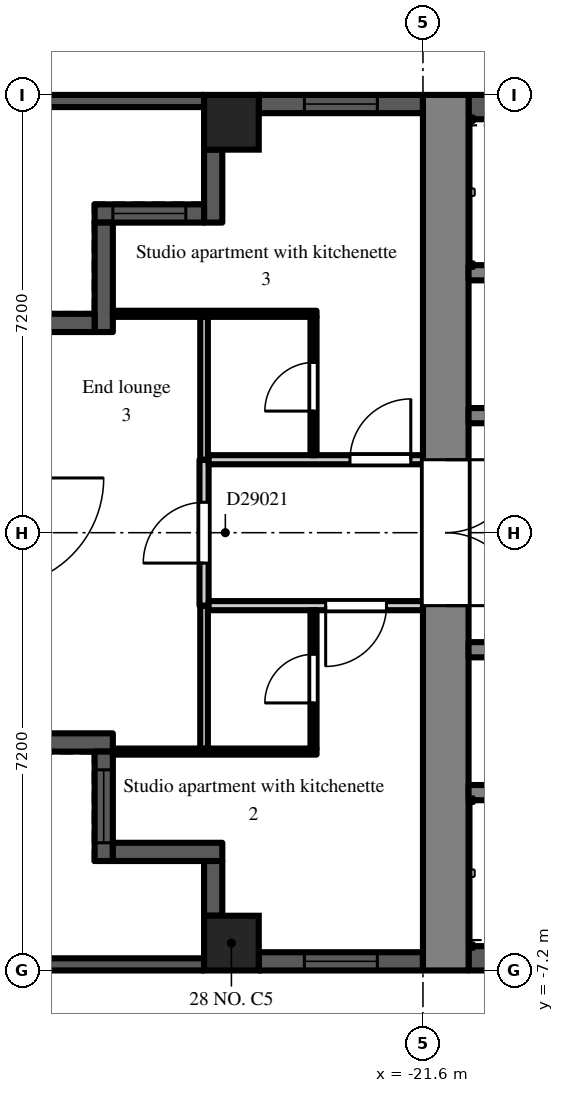
"""IFC4 building model, lengths in metres.
Left out: names, types, materials, properties, quantities, classifications, styles, units other than length and angle.
Written with IfcOpenShell. Run it as: python <this file> out.ifc"""

import sys

from ifc_helpers import new_model, si_unit, direction, frame, frame_2d, origin, origin_2d, place, context, subcontext, project, spatial, rectangle, extrude, element, fill, save


model = new_model("IFC4")
c1 = context("Model", 3, precision=1e-05, world=origin(), true_north=direction((0.0, 1.0)))
c2 = subcontext(c1, "Body", "Model", "MODEL_VIEW")
j1 = project(units=[si_unit("LENGTHUNIT", "METRE"), si_unit("PLANEANGLEUNIT", "RADIAN")], contexts=[c1])
p1 = place(None, origin())
s1 = spatial("IfcSite", under=j1, at=p1, CompositionType="ELEMENT")
p2 = place(p1, origin())
s2 = spatial("IfcBuilding", under=s1, at=p2, CompositionType="ELEMENT")
p3 = place(p2, frame((0.0, 0.0, 198.9)))
s3 = spatial("IfcBuildingStorey", under=s2, at=p3, CompositionType="ELEMENT", Elevation=198.9)
for number, where, z_axis, x_axis in (
    (1, (-24.75, -6.75, 0.0), (0.0, 0.0, 1.0), (1.0, 0.0, 0.0)),
    (2, (-24.75, 6.75, 0.0), (0.0, 0.0, 1.0), (1.0, 0.0, 0.0)),
):
    element("IfcColumn", number, at=place(p3, frame(where, z_axis=z_axis, x_axis=x_axis)), inside=s3, PredefinedType="COLUMN", context=c2, shape_type="SweptSolid", body=[
        extrude(rectangle(XDim=0.9, YDim=0.9, at=origin_2d()), origin(), (0.0, 0.0, 1.0), 3.0),
    ])
p4 = place(p3, frame((-21.6, 7.05, 0.0), z_axis=(0.0, 0.0, 1.0), x_axis=(-1.0, 0.0, 0.0)))
e3 = element("IfcWall", 3, at=p4, inside=s3, PredefinedType="SOLIDWALL", context=c2, shape_type="SweptSolid", body=[
    extrude(rectangle(XDim=2.7, YDim=0.3, at=frame_2d((1.35, 0.0))), origin(), (0.0, 0.0, 1.0), 2.3),
])
p5 = place(p4, frame((0.75, 0.0, 0.2)))
e4 = element("IfcOpeningElement", 4, at=p5, cuts=e3, PredefinedType="OPENING", context=c2, shape_type="SweptSolid", body=[
    extrude(rectangle(XDim=1.2, YDim=1.85, at=frame_2d((0.6, 0.925))), frame((0.0, 0.16, 0.0), z_axis=(0.0, -1.0, 0.0), x_axis=(1.0, 0.0, 0.0)), (0.0, 0.0, 1.0), 0.32),
])
p6 = place(p3, frame((-25.05, 6.3, 0.0), z_axis=(0.0, 0.0, 1.0), x_axis=(0.0, -1.0, 0.0)))
e5 = element("IfcWall", 5, at=p6, inside=s3, PredefinedType="SOLIDWALL", context=c2, shape_type="SweptSolid", body=[
    extrude(rectangle(XDim=1.2, YDim=0.3, at=frame_2d((0.6, 0.0))), origin(), (0.0, 0.0, 1.0), 2.6),
])
p7 = place(p3, frame((-25.2, 5.25, 0.0), z_axis=(0.0, 0.0, 1.0), x_axis=(-1.0, 0.0, 0.0)))
e6 = element("IfcWall", 6, at=p7, inside=s3, PredefinedType="SOLIDWALL", context=c2, shape_type="SweptSolid", body=[
    extrude(rectangle(XDim=1.8, YDim=0.3, at=frame_2d((0.9, 0.0))), origin(), (0.0, 0.0, 1.0), 2.6),
])
p8 = place(p7, frame((0.3, 0.0, 0.2)))
e7 = element("IfcOpeningElement", 7, at=p8, cuts=e6, PredefinedType="OPENING", context=c2, shape_type="SweptSolid", body=[
    extrude(rectangle(XDim=1.2, YDim=1.85, at=frame_2d((0.6, 0.925))), frame((0.0, 0.16, 0.0), z_axis=(0.0, -1.0, 0.0), x_axis=(1.0, 0.0, 0.0)), (0.0, 0.0, 1.0), 0.32),
])
p9 = place(p3, frame((-26.85, 5.1, 0.0), z_axis=(0.0, 0.0, 1.0), x_axis=(0.0, -1.0, 0.0)))
e8 = element("IfcWall", 8, at=p9, inside=s3, PredefinedType="SOLIDWALL", context=c2, shape_type="SweptSolid", body=[
    extrude(rectangle(XDim=1.8, YDim=0.3, at=frame_2d((0.9, 0.0))), origin(), (0.0, 0.0, 1.0), 2.6),
])
p10 = place(p3, frame((-27.0, 3.45, 0.0), z_axis=(0.0, 0.0, 1.0), x_axis=(-1.0, 0.0, 0.0)))
e9 = element("IfcWall", 9, at=p10, inside=s3, PredefinedType="SOLIDWALL", context=c2, shape_type="SweptSolid", body=[
    extrude(rectangle(XDim=0.9, YDim=0.3, at=frame_2d((0.45, 0.0))), origin(), (0.0, 0.0, 1.0), 2.6),
])
p11 = place(p3, frame((-27.9, -3.45, 0.0), z_axis=(0.0, 0.0, 1.0), x_axis=(1.0, 0.0, 0.0)))
e10 = element("IfcWall", 10, at=p11, inside=s3, PredefinedType="SOLIDWALL", context=c2, shape_type="SweptSolid", body=[
    extrude(rectangle(XDim=1.2, YDim=0.3, at=frame_2d((0.6, 0.0))), origin(), (0.0, 0.0, 1.0), 2.6),
])
p12 = place(p3, frame((-26.85, -3.6, 0.0), z_axis=(0.0, 0.0, 1.0), x_axis=(0.0, -1.0, 0.0)))
e11 = element("IfcWall", 11, at=p12, inside=s3, PredefinedType="SOLIDWALL", context=c2, shape_type="SweptSolid", body=[
    extrude(rectangle(XDim=1.8, YDim=0.3, at=frame_2d((0.9, 0.0))), origin(), (0.0, 0.0, 1.0), 2.6),
])
p13 = place(p12, frame((0.3, 0.0, 0.2)))
e12 = element("IfcOpeningElement", 12, at=p13, cuts=e11, PredefinedType="OPENING", context=c2, shape_type="SweptSolid", body=[
    extrude(rectangle(XDim=1.2, YDim=1.85, at=frame_2d((0.6, 0.925))), frame((0.0, 0.16, 0.0), z_axis=(0.0, -1.0, 0.0), x_axis=(1.0, 0.0, 0.0)), (0.0, 0.0, 1.0), 0.32),
])
p14 = place(p3, frame((-26.7, -5.25, 0.0), z_axis=(0.0, 0.0, 1.0), x_axis=(1.0, 0.0, 0.0)))
e13 = element("IfcWall", 13, at=p14, inside=s3, PredefinedType="SOLIDWALL", context=c2, shape_type="SweptSolid", body=[
    extrude(rectangle(XDim=1.8, YDim=0.3, at=frame_2d((0.9, 0.0))), origin(), (0.0, 0.0, 1.0), 2.6),
])
p15 = place(p3, frame((-25.05, -5.4, 0.0), z_axis=(0.0, 0.0, 1.0), x_axis=(0.0, -1.0, 0.0)))
e14 = element("IfcWall", 14, at=p15, inside=s3, PredefinedType="SOLIDWALL", context=c2, shape_type="SweptSolid", body=[
    extrude(rectangle(XDim=0.9, YDim=0.3, at=frame_2d((0.45, 0.0))), origin(), (0.0, 0.0, 1.0), 2.6),
])
p16 = place(p3, frame((-24.3, -7.05, 0.0), z_axis=(0.0, 0.0, 1.0), x_axis=(1.0, 0.0, 0.0)))
e15 = element("IfcWall", 15, at=p16, inside=s3, PredefinedType="SOLIDWALL", context=c2, shape_type="SweptSolid", body=[
    extrude(rectangle(XDim=2.7, YDim=0.3, at=frame_2d((1.35, 0.0))), origin(), (0.0, 0.0, 1.0), 2.3),
])
p17 = place(p16, frame((0.75, 0.0, 0.2)))
e16 = element("IfcOpeningElement", 16, at=p17, cuts=e15, PredefinedType="OPENING", context=c2, shape_type="SweptSolid", body=[
    extrude(rectangle(XDim=1.2, YDim=1.85, at=frame_2d((0.6, 0.925))), frame((0.0, 0.16, 0.0), z_axis=(0.0, -1.0, 0.0), x_axis=(1.0, 0.0, 0.0)), (0.0, 0.0, 1.0), 0.32),
])
p18 = place(p3, frame((-25.2, 7.1, 0.0), z_axis=(0.0, 0.0, 1.0), x_axis=(-1.0, 0.0, 0.0)))
e17 = element("IfcWall", 17, at=p18, inside=s3, PredefinedType="PARAPET", context=c2, shape_type="SweptSolid", body=[
    extrude(rectangle(XDim=14.2, YDim=0.2, at=frame_2d((7.1, 0.0))), origin(), (0.0, 0.0, 1.0), 1.1),
])
p19 = place(p3, frame((-39.6, -7.1, 0.0), z_axis=(0.0, 0.0, 1.0), x_axis=(1.0, 0.0, 0.0)))
e18 = element("IfcWall", 18, at=p19, inside=s3, PredefinedType="PARAPET", context=c2, shape_type="SweptSolid", body=[
    extrude(rectangle(XDim=14.4, YDim=0.2, at=frame_2d((7.2, 0.0))), origin(), (0.0, 0.0, 1.0), 1.1),
])
p20 = place(p3, frame((-21.225, -7.2, 0.0), z_axis=(0.0, 0.0, 1.0), x_axis=(0.0, 1.0, 0.0)))
e19 = element("IfcWall", 19, at=p20, inside=s3, PredefinedType="SHEAR", context=c2, shape_type="SweptSolid", body=[
    extrude(rectangle(XDim=14.4, YDim=0.75, at=frame_2d((7.2, 0.0))), origin(), (0.0, 0.0, 1.0), 2.6),
])
p21 = place(p20, frame((6.0, 0.0, 0.0)))
e20 = element("IfcOpeningElement", 20, at=p21, cuts=e19, PredefinedType="OPENING", context=c2, shape_type="SweptSolid", body=[
    extrude(rectangle(XDim=2.4, YDim=2.2, at=frame_2d((1.2, 1.1))), frame((0.0, 0.385, 0.0), z_axis=(0.0, -1.0, 0.0), x_axis=(1.0, 0.0, 0.0)), (0.0, 0.0, 1.0), 0.77),
])
p22 = place(p3, frame((-7.9, 7.0, 0.0), z_axis=(0.0, 0.0, 1.0), x_axis=(-1.0, 0.0, 0.0)))
e21 = element("IfcWall", 21, at=p22, inside=s3, PredefinedType="SHEAR", context=c2, shape_type="SweptSolid", body=[
    extrude(rectangle(XDim=12.95, YDim=0.4, at=frame_2d((6.475, 0.0))), origin(), (0.0, 0.0, 1.0), 2.6),
])
p23 = place(p3, frame((-7.9, 1.925, 0.0), z_axis=(0.0, 0.0, 1.0), x_axis=(-1.0, 0.0, 0.0)))
e22 = element("IfcWall", 22, at=p23, inside=s3, PredefinedType="SHEAR", context=c2, shape_type="SweptSolid", body=[
    extrude(rectangle(XDim=12.95, YDim=0.25, at=frame_2d((6.475, 0.0))), origin(), (0.0, 0.0, 1.0), 2.6),
])
p24 = place(p23, frame((4.825, 0.0, 0.0)))
e23 = element("IfcOpeningElement", 23, at=p24, cuts=e22, PredefinedType="OPENING", context=c2, shape_type="SweptSolid", body=[
    extrude(rectangle(XDim=1.1, YDim=2.1, at=frame_2d((0.55, 1.05))), frame((0.0, 0.135, 0.0), z_axis=(0.0, -1.0, 0.0), x_axis=(1.0, 0.0, 0.0)), (0.0, 0.0, 1.0), 0.27),
])
p25 = place(p23, frame((7.025, 0.0, 0.0)))
e24 = element("IfcOpeningElement", 24, at=p25, cuts=e22, PredefinedType="OPENING", context=c2, shape_type="SweptSolid", body=[
    extrude(rectangle(XDim=1.1, YDim=2.1, at=frame_2d((0.55, 1.05))), frame((0.0, 0.135, 0.0), z_axis=(0.0, -1.0, 0.0), x_axis=(1.0, 0.0, 0.0)), (0.0, 0.0, 1.0), 0.27),
])
p26 = place(p23, frame((9.225, 0.0, 0.0)))
e25 = element("IfcOpeningElement", 25, at=p26, cuts=e22, PredefinedType="OPENING", context=c2, shape_type="SweptSolid", body=[
    extrude(rectangle(XDim=1.1, YDim=2.1, at=frame_2d((0.55, 1.05))), frame((0.0, 0.135, 0.0), z_axis=(0.0, -1.0, 0.0), x_axis=(1.0, 0.0, 0.0)), (0.0, 0.0, 1.0), 0.27),
])
p27 = place(p23, frame((0.525, 0.0, 0.0)))
e26 = element("IfcOpeningElement", 26, at=p27, cuts=e22, PredefinedType="OPENING", context=c2, shape_type="SweptSolid", body=[
    extrude(rectangle(XDim=0.9, YDim=2.1, at=frame_2d((0.45, 1.05))), frame((0.0, 0.135, 0.0), z_axis=(0.0, -1.0, 0.0), x_axis=(1.0, 0.0, 0.0)), (0.0, 0.0, 1.0), 0.27),
])
p28 = place(p23, frame((2.625, 0.0, 0.0)))
e27 = element("IfcOpeningElement", 27, at=p28, cuts=e22, PredefinedType="OPENING", context=c2, shape_type="SweptSolid", body=[
    extrude(rectangle(XDim=1.1, YDim=2.1, at=frame_2d((0.55, 1.05))), frame((0.0, 0.135, 0.0), z_axis=(0.0, -1.0, 0.0), x_axis=(1.0, 0.0, 0.0)), (0.0, 0.0, 1.0), 0.27),
])
p29 = place(p23, frame((11.525, 0.0, 0.0)))
e28 = element("IfcOpeningElement", 28, at=p29, cuts=e22, PredefinedType="OPENING", context=c2, shape_type="SweptSolid", body=[
    extrude(rectangle(XDim=0.9, YDim=2.1, at=frame_2d((0.45, 1.05))), frame((0.0, 0.135, 0.0), z_axis=(0.0, -1.0, 0.0), x_axis=(1.0, 0.0, 0.0)), (0.0, 0.0, 1.0), 0.27),
])
p30 = place(p3, frame((-12.3, 4.275, 0.0), z_axis=(0.0, 0.0, 1.0), x_axis=(-1.0, 0.0, 0.0)))
e29 = element("IfcWall", 29, at=p30, inside=s3, PredefinedType="SHEAR", context=c2, shape_type="SweptSolid", body=[
    extrude(rectangle(XDim=8.55, YDim=0.25, at=frame_2d((4.275, 0.0))), origin(), (0.0, 0.0, 1.0), 2.6),
])
p31 = place(p3, frame((-7.9, -7.0, 0.0), z_axis=(0.0, 0.0, 1.0), x_axis=(-1.0, 0.0, 0.0)))
e30 = element("IfcWall", 30, at=p31, inside=s3, PredefinedType="SHEAR", context=c2, shape_type="SweptSolid", body=[
    extrude(rectangle(XDim=12.95, YDim=0.4, at=frame_2d((6.475, 0.0))), origin(), (0.0, 0.0, 1.0), 2.6),
])
p32 = place(p3, frame((-7.9, -1.925, 0.0), z_axis=(0.0, 0.0, 1.0), x_axis=(-1.0, 0.0, 0.0)))
e31 = element("IfcWall", 31, at=p32, inside=s3, PredefinedType="SHEAR", context=c2, shape_type="SweptSolid", body=[
    extrude(rectangle(XDim=12.95, YDim=0.25, at=frame_2d((6.475, 0.0))), origin(), (0.0, 0.0, 1.0), 2.6),
])
p33 = place(p32, frame((0.525, 0.0, 0.0)))
e32 = element("IfcOpeningElement", 32, at=p33, cuts=e31, PredefinedType="OPENING", context=c2, shape_type="SweptSolid", body=[
    extrude(rectangle(XDim=0.9, YDim=2.1, at=frame_2d((0.45, 1.05))), frame((0.0, 0.135, 0.0), z_axis=(0.0, -1.0, 0.0), x_axis=(1.0, 0.0, 0.0)), (0.0, 0.0, 1.0), 0.27),
])
p34 = place(p32, frame((2.625, 0.0, 0.0)))
e33 = element("IfcOpeningElement", 33, at=p34, cuts=e31, PredefinedType="OPENING", context=c2, shape_type="SweptSolid", body=[
    extrude(rectangle(XDim=1.1, YDim=2.1, at=frame_2d((0.55, 1.05))), frame((0.0, 0.135, 0.0), z_axis=(0.0, -1.0, 0.0), x_axis=(1.0, 0.0, 0.0)), (0.0, 0.0, 1.0), 0.27),
])
p35 = place(p32, frame((6.025, 0.0, 0.0)))
e34 = element("IfcOpeningElement", 34, at=p35, cuts=e31, PredefinedType="OPENING", context=c2, shape_type="SweptSolid", body=[
    extrude(rectangle(XDim=0.9, YDim=2.1, at=frame_2d((0.45, 1.05))), frame((0.0, 0.135, 0.0), z_axis=(0.0, -1.0, 0.0), x_axis=(1.0, 0.0, 0.0)), (0.0, 0.0, 1.0), 0.27),
])
p36 = place(p32, frame((10.425, 0.0, 0.0)))
e35 = element("IfcOpeningElement", 35, at=p36, cuts=e31, PredefinedType="OPENING", context=c2, shape_type="SweptSolid", body=[
    extrude(rectangle(XDim=0.9, YDim=2.1, at=frame_2d((0.45, 1.05))), frame((0.0, 0.135, 0.0), z_axis=(0.0, -1.0, 0.0), x_axis=(1.0, 0.0, 0.0)), (0.0, 0.0, 1.0), 0.27),
])
p37 = place(p3, frame((-12.3, -4.275, 0.0), z_axis=(0.0, 0.0, 1.0), x_axis=(-1.0, 0.0, 0.0)))
e36 = element("IfcWall", 36, at=p37, inside=s3, PredefinedType="SHEAR", context=c2, shape_type="SweptSolid", body=[
    extrude(rectangle(XDim=8.55, YDim=0.25, at=frame_2d((4.275, 0.0))), origin(), (0.0, 0.0, 1.0), 2.6),
])
for number, where, z_axis, x_axis in (
    (37, (-26.7, -3.6, 0.0), (0.0, 0.0, 1.0), (1.0, 0.0, 0.0)),
    (38, (-26.7, 3.6, 0.0), (0.0, 0.0, 1.0), (1.0, 0.0, 0.0)),
):
    element("IfcWall", number, at=place(p3, frame(where, z_axis=z_axis, x_axis=x_axis)), inside=s3, PredefinedType="PARTITIONING", context=c2, shape_type="SweptSolid", body=[
        extrude(rectangle(XDim=3.35, YDim=0.1, at=frame_2d((1.675, 0.0))), origin(), (0.0, 0.0, 1.0), 2.6),
    ])
p38 = place(p3, frame((-25.2, -3.55, 0.0), z_axis=(0.0, 0.0, 1.0), x_axis=(0.0, 1.0, 0.0)))
e39 = element("IfcWall", 39, at=p38, inside=s3, PredefinedType="PARTITIONING", context=c2, shape_type="SweptSolid", body=[
    extrude(rectangle(XDim=2.35, YDim=0.125, at=frame_2d((1.175, 0.0))), origin(), (0.0, 0.0, 1.0), 2.6),
])
p39 = place(p3, frame((-25.2, -1.2, 0.0), z_axis=(0.0, 0.0, 1.0), x_axis=(0.0, 1.0, 0.0)))
e40 = element("IfcWall", 40, at=p39, inside=s3, PredefinedType="PARTITIONING", context=c2, shape_type="SweptSolid", body=[
    extrude(rectangle(XDim=2.4, YDim=0.15, at=frame_2d((1.2, 0.0))), origin(), (0.0, 0.0, 1.0), 2.6),
])
p40 = place(p39, frame((0.7, 0.0, 0.0)))
e41 = element("IfcOpeningElement", 41, at=p40, cuts=e40, PredefinedType="OPENING", context=c2, shape_type="SweptSolid", body=[
    extrude(rectangle(XDim=1.0, YDim=2.1, at=frame_2d((0.5, 1.05))), frame((0.0, 0.085, 0.0), z_axis=(0.0, -1.0, 0.0), x_axis=(1.0, 0.0, 0.0)), (0.0, 0.0, 1.0), 0.17),
])
p41 = place(p3, frame((-25.125, -1.2, 0.0), z_axis=(0.0, 0.0, 1.0), x_axis=(1.0, 0.0, 0.0)))
e42 = element("IfcWall", 42, at=p41, inside=s3, PredefinedType="PARTITIONING", context=c2, shape_type="SweptSolid", body=[
    extrude(rectangle(XDim=3.525, YDim=0.15, at=frame_2d((1.762, 0.0))), origin(), (0.0, 0.0, 1.0), 2.6),
])
p42 = place(p41, frame((1.925, 0.0, 0.0)))
e43 = element("IfcOpeningElement", 43, at=p42, cuts=e42, PredefinedType="OPENING", context=c2, shape_type="SweptSolid", body=[
    extrude(rectangle(XDim=1.0, YDim=2.1, at=frame_2d((0.5, 1.05))), frame((0.0, 0.085, 0.0), z_axis=(0.0, -1.0, 0.0), x_axis=(1.0, 0.0, 0.0)), (0.0, 0.0, 1.0), 0.17),
])
p43 = place(p3, frame((-25.2, 1.2, 0.0), z_axis=(0.0, 0.0, 1.0), x_axis=(0.0, 1.0, 0.0)))
e44 = element("IfcWall", 44, at=p43, inside=s3, PredefinedType="PARTITIONING", context=c2, shape_type="SweptSolid", body=[
    extrude(rectangle(XDim=2.35, YDim=0.125, at=frame_2d((1.175, 0.0))), origin(), (0.0, 0.0, 1.0), 2.6),
])
p44 = place(p3, frame((-25.125, 1.2, 0.0), z_axis=(0.0, 0.0, 1.0), x_axis=(1.0, 0.0, 0.0)))
e45 = element("IfcWall", 45, at=p44, inside=s3, PredefinedType="PARTITIONING", context=c2, shape_type="SweptSolid", body=[
    extrude(rectangle(XDim=3.525, YDim=0.15, at=frame_2d((1.762, 0.0))), origin(), (0.0, 0.0, 1.0), 2.6),
])
p45 = place(p44, frame((2.325, 0.0, 0.0)))
e46 = element("IfcOpeningElement", 46, at=p45, cuts=e45, PredefinedType="OPENING", context=c2, shape_type="SweptSolid", body=[
    extrude(rectangle(XDim=1.0, YDim=2.1, at=frame_2d((0.5, 1.05))), frame((0.0, 0.085, 0.0), z_axis=(0.0, -1.0, 0.0), x_axis=(1.0, 0.0, 0.0)), (0.0, 0.0, 1.0), 0.17),
])
p46 = place(p3, frame((-23.4, -3.55, 0.0), z_axis=(0.0, 0.0, 1.0), x_axis=(0.0, 1.0, 0.0)))
e47 = element("IfcWall", 47, at=p46, inside=s3, PredefinedType="PARTITIONING", context=c2, shape_type="SweptSolid", body=[
    extrude(rectangle(XDim=2.275, YDim=0.1, at=frame_2d((1.138, 0.0))), origin(), (0.0, 0.0, 1.0), 2.6),
])
p47 = place(p46, frame((0.75, 0.0, 0.0)))
e48 = element("IfcOpeningElement", 48, at=p47, cuts=e47, PredefinedType="OPENING", context=c2, shape_type="SweptSolid", body=[
    extrude(rectangle(XDim=0.8, YDim=2.1, at=frame_2d((0.4, 1.05))), frame((0.0, 0.06, 0.0), z_axis=(0.0, -1.0, 0.0), x_axis=(1.0, 0.0, 0.0)), (0.0, 0.0, 1.0), 0.12),
])
p48 = place(p3, frame((-23.4, 1.275, 0.0), z_axis=(0.0, 0.0, 1.0), x_axis=(0.0, 1.0, 0.0)))
e49 = element("IfcWall", 49, at=p48, inside=s3, PredefinedType="PARTITIONING", context=c2, shape_type="SweptSolid", body=[
    extrude(rectangle(XDim=2.275, YDim=0.1, at=frame_2d((1.138, 0.0))), origin(), (0.0, 0.0, 1.0), 2.6),
])
p49 = place(p48, frame((0.725, 0.0, 0.0)))
e50 = element("IfcOpeningElement", 50, at=p49, cuts=e49, PredefinedType="OPENING", context=c2, shape_type="SweptSolid", body=[
    extrude(rectangle(XDim=0.8, YDim=2.1, at=frame_2d((0.4, 1.05))), frame((0.0, 0.06, 0.0), z_axis=(0.0, -1.0, 0.0), x_axis=(1.0, 0.0, 0.0)), (0.0, 0.0, 1.0), 0.12),
])
p50 = place(p5, origin())
e51 = element("IfcWindow", 51, at=p50, inside=s3, PartitioningType="SINGLE_PANEL", PredefinedType="WINDOW", context=c2, shape_type="SweptSolid", body=[
    extrude(rectangle(XDim=1.2, YDim=1.85, at=frame_2d((0.6, 0.925))), frame((0.0, 0.03, 0.0), z_axis=(0.0, -1.0, 0.0), x_axis=(1.0, 0.0, 0.0)), (0.0, 0.0, 1.0), 0.06),
])
fill(e4, e51)
p51 = place(p8, origin())
e52 = element("IfcWindow", 52, at=p51, inside=s3, PartitioningType="SINGLE_PANEL", PredefinedType="WINDOW", context=c2, shape_type="SweptSolid", body=[
    extrude(rectangle(XDim=1.2, YDim=1.85, at=frame_2d((0.6, 0.925))), frame((0.0, 0.03, 0.0), z_axis=(0.0, -1.0, 0.0), x_axis=(1.0, 0.0, 0.0)), (0.0, 0.0, 1.0), 0.06),
])
fill(e7, e52)
p52 = place(p13, origin())
e53 = element("IfcWindow", 53, at=p52, inside=s3, PartitioningType="SINGLE_PANEL", PredefinedType="WINDOW", context=c2, shape_type="SweptSolid", body=[
    extrude(rectangle(XDim=1.2, YDim=1.85, at=frame_2d((0.6, 0.925))), frame((0.0, 0.03, 0.0), z_axis=(0.0, -1.0, 0.0), x_axis=(1.0, 0.0, 0.0)), (0.0, 0.0, 1.0), 0.06),
])
fill(e12, e53)
p53 = place(p17, origin())
e54 = element("IfcWindow", 54, at=p53, inside=s3, PartitioningType="SINGLE_PANEL", PredefinedType="WINDOW", context=c2, shape_type="SweptSolid", body=[
    extrude(rectangle(XDim=1.2, YDim=1.85, at=frame_2d((0.6, 0.925))), frame((0.0, 0.03, 0.0), z_axis=(0.0, -1.0, 0.0), x_axis=(1.0, 0.0, 0.0)), (0.0, 0.0, 1.0), 0.06),
])
fill(e16, e54)
p54 = place(p21, frame((2.4, 0.0, 0.0), z_axis=(0.0, 0.0, 1.0), x_axis=(-1.0, 0.0, 0.0)))
e55 = element("IfcDoor", 55, at=p54, inside=s3, OperationType="DOUBLE_DOOR_DOUBLE_SWING", PredefinedType="DOOR", context=c2, shape_type="SweptSolid", body=[
    extrude(rectangle(XDim=2.4, YDim=2.2, at=frame_2d((1.2, 1.1))), frame((0.0, 0.025, 0.0), z_axis=(0.0, -1.0, 0.0), x_axis=(1.0, 0.0, 0.0)), (0.0, 0.0, 1.0), 0.05),
])
fill(e20, e55)
p55 = place(p40, origin())
e56 = element("IfcDoor", 56, at=p55, inside=s3, OperationType="SINGLE_SWING_LEFT", PredefinedType="DOOR", context=c2, shape_type="SweptSolid", body=[
    extrude(rectangle(XDim=1.0, YDim=2.1, at=frame_2d((0.5, 1.05))), frame((0.0, 0.025, 0.0), z_axis=(0.0, -1.0, 0.0), x_axis=(1.0, 0.0, 0.0)), (0.0, 0.0, 1.0), 0.05),
])
fill(e41, e56)
p56 = place(p47, origin())
e57 = element("IfcDoor", 57, at=p56, inside=s3, OperationType="SINGLE_SWING_LEFT", PredefinedType="DOOR", context=c2, shape_type="SweptSolid", body=[
    extrude(rectangle(XDim=0.8, YDim=2.1, at=frame_2d((0.4, 1.05))), frame((0.0, 0.025, 0.0), z_axis=(0.0, -1.0, 0.0), x_axis=(1.0, 0.0, 0.0)), (0.0, 0.0, 1.0), 0.05),
])
fill(e48, e57)
p57 = place(p42, frame((1.0, 0.0, 0.0), z_axis=(0.0, 0.0, 1.0), x_axis=(-1.0, 0.0, 0.0)))
e58 = element("IfcDoor", 58, at=p57, inside=s3, OperationType="SINGLE_SWING_RIGHT", PredefinedType="DOOR", context=c2, shape_type="SweptSolid", body=[
    extrude(rectangle(XDim=1.0, YDim=2.1, at=frame_2d((0.5, 1.05))), frame((0.0, 0.025, 0.0), z_axis=(0.0, -1.0, 0.0), x_axis=(1.0, 0.0, 0.0)), (0.0, 0.0, 1.0), 0.05),
])
fill(e43, e58)
p58 = place(p49, origin())
e59 = element("IfcDoor", 59, at=p58, inside=s3, OperationType="SINGLE_SWING_LEFT", PredefinedType="DOOR", context=c2, shape_type="SweptSolid", body=[
    extrude(rectangle(XDim=0.8, YDim=2.1, at=frame_2d((0.4, 1.05))), frame((0.0, 0.025, 0.0), z_axis=(0.0, -1.0, 0.0), x_axis=(1.0, 0.0, 0.0)), (0.0, 0.0, 1.0), 0.05),
])
fill(e50, e59)
p59 = place(p45, origin())
e60 = element("IfcDoor", 60, at=p59, inside=s3, OperationType="SINGLE_SWING_RIGHT", PredefinedType="DOOR", context=c2, shape_type="SweptSolid", body=[
    extrude(rectangle(XDim=1.0, YDim=2.1, at=frame_2d((0.5, 1.05))), frame((0.0, 0.025, 0.0), z_axis=(0.0, -1.0, 0.0), x_axis=(1.0, 0.0, 0.0)), (0.0, 0.0, 1.0), 0.05),
])
fill(e46, e60)
save(model, sys.argv[1])
